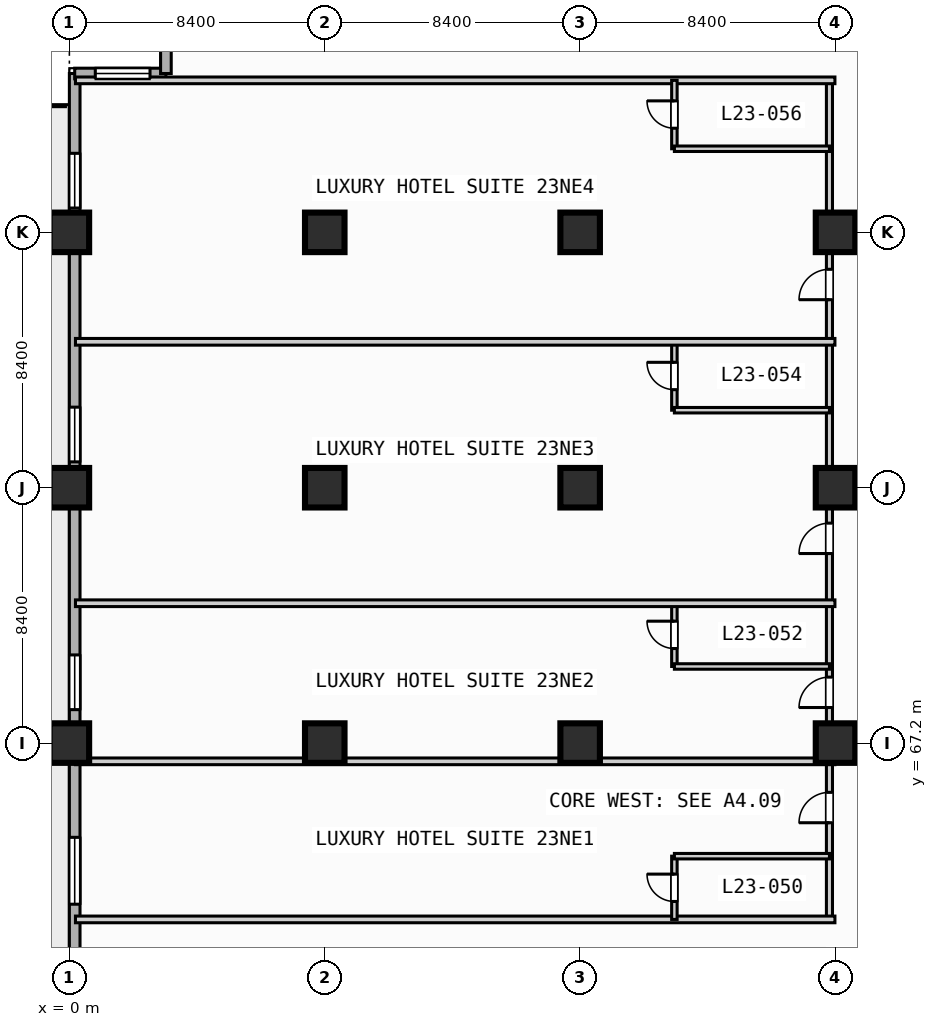
"""IFC4 building model, lengths in metres.
Left out: names, types, materials, properties, quantities, classifications, styles, units other than length and angle.
Written with IfcOpenShell. Run it as: python <this file> out.ifc"""

import sys

from ifc_helpers import new_model, si_unit, direction, frame, frame_2d, origin, origin_2d, place, context, subcontext, project, spatial, rectangle, extrude, element, fill, save


model = new_model("IFC4")
c1 = context("Model", 3, precision=1e-05, world=origin(), true_north=direction((0.0, 1.0)))
c2 = subcontext(c1, "Body", "Model", "MODEL_VIEW")
j1 = project(units=[si_unit("LENGTHUNIT", "METRE"), si_unit("PLANEANGLEUNIT", "RADIAN")], contexts=[c1])
p1 = place(None, origin())
s1 = spatial("IfcSite", under=j1, at=p1, CompositionType="ELEMENT")
p2 = place(p1, origin())
s2 = spatial("IfcBuilding", under=s1, at=p2, CompositionType="ELEMENT")
p3 = place(p2, frame((0.0, 0.0, 100.0)))
s3 = spatial("IfcBuildingStorey", under=s2, at=p3, CompositionType="ELEMENT", Elevation=100.0)
for number, where, z_axis, x_axis in (
    (1, (0.0, 67.2, 0.0), (0.0, 0.0, 1.0), (1.0, 0.0, 0.0)),
    (2, (0.0, 75.6, 0.0), (0.0, 0.0, 1.0), (1.0, 0.0, 0.0)),
    (3, (0.0, 84.0, 0.0), (0.0, 0.0, 1.0), (1.0, 0.0, 0.0)),
    (4, (8.4, 67.2, 0.0), (0.0, 0.0, 1.0), (1.0, 0.0, 0.0)),
    (5, (8.4, 75.6, 0.0), (0.0, 0.0, 1.0), (1.0, 0.0, 0.0)),
    (6, (8.4, 84.0, 0.0), (0.0, 0.0, 1.0), (1.0, 0.0, 0.0)),
    (7, (16.8, 67.2, 0.0), (0.0, 0.0, 1.0), (1.0, 0.0, 0.0)),
    (8, (16.8, 75.6, 0.0), (0.0, 0.0, 1.0), (1.0, 0.0, 0.0)),
    (9, (16.8, 84.0, 0.0), (0.0, 0.0, 1.0), (1.0, 0.0, 0.0)),
    (10, (25.2, 67.2, 0.0), (0.0, 0.0, 1.0), (1.0, 0.0, 0.0)),
    (11, (25.2, 75.6, 0.0), (0.0, 0.0, 1.0), (1.0, 0.0, 0.0)),
    (12, (25.2, 84.0, 0.0), (0.0, 0.0, 1.0), (1.0, 0.0, 0.0)),
):
    element("IfcColumn", number, at=place(p3, frame(where, z_axis=z_axis, x_axis=x_axis)), inside=s3, PredefinedType="COLUMN", context=c2, shape_type="SweptSolid", body=[
        extrude(rectangle(XDim=1.3, YDim=1.3, at=origin_2d()), origin(), (0.0, 0.0, 1.0), 3.8),
    ])
p4 = place(p3, frame((0.175, 3.175, 0.0), z_axis=(0.0, 0.0, 1.0), x_axis=(0.0, 1.0, 0.0)))
e13 = element("IfcWall", 13, at=p4, inside=s3, PredefinedType="STANDARD", context=c2, shape_type="SweptSolid", body=[
    extrude(rectangle(XDim=86.05, YDim=0.35, at=frame_2d((43.025, 0.0))), origin(), (0.0, 0.0, 1.0), 3.55),
])
p5 = place(p4, frame((42.325, 0.0, 0.0)))
e14 = element("IfcOpeningElement", 14, at=p5, cuts=e13, PredefinedType="OPENING", context=c2, shape_type="SweptSolid", body=[
    extrude(rectangle(XDim=1.4, YDim=2.2, at=frame_2d((0.7, 1.1))), frame((0.0, 0.185, 0.0), z_axis=(0.0, -1.0, 0.0), x_axis=(1.0, 0.0, 0.0)), (0.0, 0.0, 1.0), 0.37),
])
p6 = place(p4, frame((25.125, 0.0, 0.85)))
e15 = element("IfcOpeningElement", 15, at=p6, cuts=e13, PredefinedType="OPENING", context=c2, shape_type="SweptSolid", body=[
    extrude(rectangle(XDim=2.2, YDim=1.8, at=frame_2d((1.1, 0.9))), frame((0.0, 0.185, 0.0), z_axis=(0.0, -1.0, 0.0), x_axis=(1.0, 0.0, 0.0)), (0.0, 0.0, 1.0), 0.37),
])
p7 = place(p4, frame((33.525, 0.0, 0.85)))
e16 = element("IfcOpeningElement", 16, at=p7, cuts=e13, PredefinedType="OPENING", context=c2, shape_type="SweptSolid", body=[
    extrude(rectangle(XDim=2.2, YDim=1.8, at=frame_2d((1.1, 0.9))), frame((0.0, 0.185, 0.0), z_axis=(0.0, -1.0, 0.0), x_axis=(1.0, 0.0, 0.0)), (0.0, 0.0, 1.0), 0.37),
])
p8 = place(p4, frame((58.725, 0.0, 0.85)))
e17 = element("IfcOpeningElement", 17, at=p8, cuts=e13, PredefinedType="OPENING", context=c2, shape_type="SweptSolid", body=[
    extrude(rectangle(XDim=2.2, YDim=1.8, at=frame_2d((1.1, 0.9))), frame((0.0, 0.185, 0.0), z_axis=(0.0, -1.0, 0.0), x_axis=(1.0, 0.0, 0.0)), (0.0, 0.0, 1.0), 0.37),
])
p9 = place(p4, frame((65.125, 0.0, 0.85)))
e18 = element("IfcOpeningElement", 18, at=p9, cuts=e13, PredefinedType="OPENING", context=c2, shape_type="SweptSolid", body=[
    extrude(rectangle(XDim=1.8, YDim=1.8, at=frame_2d((0.9, 0.9))), frame((0.0, 0.185, 0.0), z_axis=(0.0, -1.0, 0.0), x_axis=(1.0, 0.0, 0.0)), (0.0, 0.0, 1.0), 0.37),
])
p10 = place(p4, frame((73.275, 0.0, 0.85)))
e19 = element("IfcOpeningElement", 19, at=p10, cuts=e13, PredefinedType="OPENING", context=c2, shape_type="SweptSolid", body=[
    extrude(rectangle(XDim=1.8, YDim=1.8, at=frame_2d((0.9, 0.9))), frame((0.0, 0.185, 0.0), z_axis=(0.0, -1.0, 0.0), x_axis=(1.0, 0.0, 0.0)), (0.0, 0.0, 1.0), 0.37),
])
p11 = place(p4, frame((81.625, 0.0, 0.85)))
e20 = element("IfcOpeningElement", 20, at=p11, cuts=e13, PredefinedType="OPENING", context=c2, shape_type="SweptSolid", body=[
    extrude(rectangle(XDim=1.8, YDim=1.8, at=frame_2d((0.9, 0.9))), frame((0.0, 0.185, 0.0), z_axis=(0.0, -1.0, 0.0), x_axis=(1.0, 0.0, 0.0)), (0.0, 0.0, 1.0), 0.37),
])
p12 = place(p3, frame((0.175, 89.225, 0.0), z_axis=(0.0, 0.0, 1.0), x_axis=(1.0, 0.0, 0.0)))
e21 = element("IfcWall", 21, at=p12, inside=s3, PredefinedType="STANDARD", context=c2, shape_type="SweptSolid", body=[
    extrude(rectangle(XDim=3.0, YDim=0.35, at=frame_2d((1.5, 0.0))), origin(), (0.0, 0.0, 1.0), 3.55),
])
p13 = place(p12, frame((0.677, 0.0, 0.85)))
e22 = element("IfcOpeningElement", 22, at=p13, cuts=e21, PredefinedType="OPENING", context=c2, shape_type="SweptSolid", body=[
    extrude(rectangle(XDim=1.8, YDim=1.8, at=frame_2d((0.9, 0.9))), frame((0.0, 0.185, 0.0), z_axis=(0.0, -1.0, 0.0), x_axis=(1.0, 0.0, 0.0)), (0.0, 0.0, 1.0), 0.37),
])
p14 = place(p3, frame((3.175, 89.225, 0.0), z_axis=(0.0, 0.0, 1.0), x_axis=(0.0, 1.0, 0.0)))
e23 = element("IfcWall", 23, at=p14, inside=s3, PredefinedType="STANDARD", context=c2, shape_type="SweptSolid", body=[
    extrude(rectangle(XDim=3.0, YDim=0.35, at=frame_2d((1.5, 0.0))), origin(), (0.0, 0.0, 1.0), 3.55),
])
p15 = place(p3, frame((25.0, 61.4, 0.0), z_axis=(0.0, 0.0, 1.0), x_axis=(0.0, 1.0, 0.0)))
e24 = element("IfcWall", 24, at=p15, inside=s3, PredefinedType="PARTITIONING", context=c2, shape_type="SweptSolid", body=[
    extrude(rectangle(XDim=27.6, YDim=0.2, at=frame_2d((13.8, 0.0))), origin(), (0.0, 0.0, 1.0), 2.8),
])
p16 = place(p15, frame((3.18, 0.0, 0.0)))
e25 = element("IfcOpeningElement", 25, at=p16, cuts=e24, PredefinedType="OPENING", context=c2, shape_type="SweptSolid", body=[
    extrude(rectangle(XDim=1.0, YDim=2.15, at=frame_2d((0.5, 1.075))), frame((0.0, 0.11, 0.0), z_axis=(0.0, -1.0, 0.0), x_axis=(1.0, 0.0, 0.0)), (0.0, 0.0, 1.0), 0.22),
])
p17 = place(p15, frame((6.97, 0.0, 0.0)))
e26 = element("IfcOpeningElement", 26, at=p17, cuts=e24, PredefinedType="OPENING", context=c2, shape_type="SweptSolid", body=[
    extrude(rectangle(XDim=1.0, YDim=2.15, at=frame_2d((0.5, 1.075))), frame((0.0, 0.11, 0.0), z_axis=(0.0, -1.0, 0.0), x_axis=(1.0, 0.0, 0.0)), (0.0, 0.0, 1.0), 0.22),
])
p18 = place(p15, frame((12.035, 0.0, 0.0)))
e27 = element("IfcOpeningElement", 27, at=p18, cuts=e24, PredefinedType="OPENING", context=c2, shape_type="SweptSolid", body=[
    extrude(rectangle(XDim=1.0, YDim=2.15, at=frame_2d((0.5, 1.075))), frame((0.0, 0.11, 0.0), z_axis=(0.0, -1.0, 0.0), x_axis=(1.0, 0.0, 0.0)), (0.0, 0.0, 1.0), 0.22),
])
p19 = place(p15, frame((20.385, 0.0, 0.0)))
e28 = element("IfcOpeningElement", 28, at=p19, cuts=e24, PredefinedType="OPENING", context=c2, shape_type="SweptSolid", body=[
    extrude(rectangle(XDim=1.0, YDim=2.15, at=frame_2d((0.5, 1.075))), frame((0.0, 0.11, 0.0), z_axis=(0.0, -1.0, 0.0), x_axis=(1.0, 0.0, 0.0)), (0.0, 0.0, 1.0), 0.22),
])
p20 = place(p3, frame((0.2, 61.4, 0.0), z_axis=(0.0, 0.0, 1.0), x_axis=(1.0, 0.0, 0.0)))
e29 = element("IfcWall", 29, at=p20, inside=s3, PredefinedType="PARTITIONING", context=c2, shape_type="SweptSolid", body=[
    extrude(rectangle(XDim=24.98, YDim=0.22, at=frame_2d((12.49, 0.0))), origin(), (0.0, 0.0, 1.0), 3.55),
])
p21 = place(p3, frame((19.9, 61.4, 0.0), z_axis=(0.0, 0.0, 1.0), x_axis=(0.0, 1.0, 0.0)))
e30 = element("IfcWall", 30, at=p21, inside=s3, PredefinedType="PLUMBINGWALL", context=c2, shape_type="SweptSolid", body=[
    extrude(rectangle(XDim=2.08, YDim=0.18, at=frame_2d((1.04, 0.0))), origin(), (0.0, 0.0, 1.0), 3.55),
])
p22 = place(p21, frame((0.59, 0.0, 0.0)))
e31 = element("IfcOpeningElement", 31, at=p22, cuts=e30, PredefinedType="OPENING", context=c2, shape_type="SweptSolid", body=[
    extrude(rectangle(XDim=0.9, YDim=2.1, at=frame_2d((0.45, 1.05))), frame((0.0, 0.1, 0.0), z_axis=(0.0, -1.0, 0.0), x_axis=(1.0, 0.0, 0.0)), (0.0, 0.0, 1.0), 0.2),
])
p23 = place(p3, frame((19.9, 63.48, 0.0), z_axis=(0.0, 0.0, 1.0), x_axis=(1.0, 0.0, 0.0)))
e32 = element("IfcWall", 32, at=p23, inside=s3, PredefinedType="PLUMBINGWALL", context=c2, shape_type="SweptSolid", body=[
    extrude(rectangle(XDim=5.1, YDim=0.18, at=frame_2d((2.55, 0.0))), origin(), (0.0, 0.0, 1.0), 3.55),
])
p24 = place(p3, frame((0.2, 66.6, 0.0), z_axis=(0.0, 0.0, 1.0), x_axis=(1.0, 0.0, 0.0)))
e33 = element("IfcWall", 33, at=p24, inside=s3, PredefinedType="PARTITIONING", context=c2, shape_type="SweptSolid", body=[
    extrude(rectangle(XDim=24.98, YDim=0.22, at=frame_2d((12.49, 0.0))), origin(), (0.0, 0.0, 1.0), 3.55),
])
p25 = place(p3, frame((19.9, 69.72, 0.0), z_axis=(0.0, 0.0, 1.0), x_axis=(0.0, 1.0, 0.0)))
e34 = element("IfcWall", 34, at=p25, inside=s3, PredefinedType="PLUMBINGWALL", context=c2, shape_type="SweptSolid", body=[
    extrude(rectangle(XDim=2.08, YDim=0.18, at=frame_2d((1.04, 0.0))), origin(), (0.0, 0.0, 1.0), 3.55),
])
p26 = place(p25, frame((0.59, 0.0, 0.0)))
e35 = element("IfcOpeningElement", 35, at=p26, cuts=e34, PredefinedType="OPENING", context=c2, shape_type="SweptSolid", body=[
    extrude(rectangle(XDim=0.9, YDim=2.1, at=frame_2d((0.45, 1.05))), frame((0.0, 0.1, 0.0), z_axis=(0.0, -1.0, 0.0), x_axis=(1.0, 0.0, 0.0)), (0.0, 0.0, 1.0), 0.2),
])
p27 = place(p3, frame((19.9, 69.72, 0.0), z_axis=(0.0, 0.0, 1.0), x_axis=(1.0, 0.0, 0.0)))
e36 = element("IfcWall", 36, at=p27, inside=s3, PredefinedType="PLUMBINGWALL", context=c2, shape_type="SweptSolid", body=[
    extrude(rectangle(XDim=5.1, YDim=0.18, at=frame_2d((2.55, 0.0))), origin(), (0.0, 0.0, 1.0), 3.55),
])
p28 = place(p3, frame((0.2, 71.8, 0.0), z_axis=(0.0, 0.0, 1.0), x_axis=(1.0, 0.0, 0.0)))
e37 = element("IfcWall", 37, at=p28, inside=s3, PredefinedType="PARTITIONING", context=c2, shape_type="SweptSolid", body=[
    extrude(rectangle(XDim=24.98, YDim=0.22, at=frame_2d((12.49, 0.0))), origin(), (0.0, 0.0, 1.0), 3.55),
])
p29 = place(p3, frame((19.9, 78.15, 0.0), z_axis=(0.0, 0.0, 1.0), x_axis=(0.0, 1.0, 0.0)))
e38 = element("IfcWall", 38, at=p29, inside=s3, PredefinedType="PLUMBINGWALL", context=c2, shape_type="SweptSolid", body=[
    extrude(rectangle(XDim=2.25, YDim=0.18, at=frame_2d((1.125, 0.0))), origin(), (0.0, 0.0, 1.0), 3.55),
])
p30 = place(p29, frame((0.675, 0.0, 0.0)))
e39 = element("IfcOpeningElement", 39, at=p30, cuts=e38, PredefinedType="OPENING", context=c2, shape_type="SweptSolid", body=[
    extrude(rectangle(XDim=0.9, YDim=2.1, at=frame_2d((0.45, 1.05))), frame((0.0, 0.1, 0.0), z_axis=(0.0, -1.0, 0.0), x_axis=(1.0, 0.0, 0.0)), (0.0, 0.0, 1.0), 0.2),
])
p31 = place(p3, frame((19.9, 78.15, 0.0), z_axis=(0.0, 0.0, 1.0), x_axis=(1.0, 0.0, 0.0)))
e40 = element("IfcWall", 40, at=p31, inside=s3, PredefinedType="PLUMBINGWALL", context=c2, shape_type="SweptSolid", body=[
    extrude(rectangle(XDim=5.1, YDim=0.18, at=frame_2d((2.55, 0.0))), origin(), (0.0, 0.0, 1.0), 3.55),
])
for number, where, z_axis, x_axis in (
    (41, (0.2, 80.4, 0.0), (0.0, 0.0, 1.0), (1.0, 0.0, 0.0)),
    (42, (0.2, 89.0, 0.0), (0.0, 0.0, 1.0), (1.0, 0.0, 0.0)),
):
    element("IfcWall", number, at=place(p3, frame(where, z_axis=z_axis, x_axis=x_axis)), inside=s3, PredefinedType="PARTITIONING", context=c2, shape_type="SweptSolid", body=[
        extrude(rectangle(XDim=24.98, YDim=0.22, at=frame_2d((12.49, 0.0))), origin(), (0.0, 0.0, 1.0), 3.55),
    ])
p32 = place(p3, frame((19.9, 86.75, 0.0), z_axis=(0.0, 0.0, 1.0), x_axis=(0.0, 1.0, 0.0)))
e43 = element("IfcWall", 43, at=p32, inside=s3, PredefinedType="PLUMBINGWALL", context=c2, shape_type="SweptSolid", body=[
    extrude(rectangle(XDim=2.25, YDim=0.18, at=frame_2d((1.125, 0.0))), origin(), (0.0, 0.0, 1.0), 3.55),
])
p33 = place(p32, frame((0.675, 0.0, 0.0)))
e44 = element("IfcOpeningElement", 44, at=p33, cuts=e43, PredefinedType="OPENING", context=c2, shape_type="SweptSolid", body=[
    extrude(rectangle(XDim=0.9, YDim=2.1, at=frame_2d((0.45, 1.05))), frame((0.0, 0.1, 0.0), z_axis=(0.0, -1.0, 0.0), x_axis=(1.0, 0.0, 0.0)), (0.0, 0.0, 1.0), 0.2),
])
p34 = place(p3, frame((19.9, 86.75, 0.0), z_axis=(0.0, 0.0, 1.0), x_axis=(1.0, 0.0, 0.0)))
e45 = element("IfcWall", 45, at=p34, inside=s3, PredefinedType="PLUMBINGWALL", context=c2, shape_type="SweptSolid", body=[
    extrude(rectangle(XDim=5.1, YDim=0.18, at=frame_2d((2.55, 0.0))), origin(), (0.0, 0.0, 1.0), 3.55),
])
p35 = place(p8, origin())
e46 = element("IfcWindow", 46, at=p35, inside=s3, PartitioningType="SINGLE_PANEL", PredefinedType="WINDOW", context=c2, shape_type="SweptSolid", body=[
    extrude(rectangle(XDim=2.2, YDim=1.8, at=frame_2d((1.1, 0.9))), frame((0.0, 0.03, 0.0), z_axis=(0.0, -1.0, 0.0), x_axis=(1.0, 0.0, 0.0)), (0.0, 0.0, 1.0), 0.06),
])
fill(e17, e46)
p36 = place(p9, origin())
e47 = element("IfcWindow", 47, at=p36, inside=s3, PartitioningType="SINGLE_PANEL", PredefinedType="WINDOW", context=c2, shape_type="SweptSolid", body=[
    extrude(rectangle(XDim=1.8, YDim=1.8, at=frame_2d((0.9, 0.9))), frame((0.0, 0.03, 0.0), z_axis=(0.0, -1.0, 0.0), x_axis=(1.0, 0.0, 0.0)), (0.0, 0.0, 1.0), 0.06),
])
fill(e18, e47)
p37 = place(p10, origin())
e48 = element("IfcWindow", 48, at=p37, inside=s3, PartitioningType="SINGLE_PANEL", PredefinedType="WINDOW", context=c2, shape_type="SweptSolid", body=[
    extrude(rectangle(XDim=1.8, YDim=1.8, at=frame_2d((0.9, 0.9))), frame((0.0, 0.03, 0.0), z_axis=(0.0, -1.0, 0.0), x_axis=(1.0, 0.0, 0.0)), (0.0, 0.0, 1.0), 0.06),
])
fill(e19, e48)
p38 = place(p11, origin())
e49 = element("IfcWindow", 49, at=p38, inside=s3, PartitioningType="SINGLE_PANEL", PredefinedType="WINDOW", context=c2, shape_type="SweptSolid", body=[
    extrude(rectangle(XDim=1.8, YDim=1.8, at=frame_2d((0.9, 0.9))), frame((0.0, 0.03, 0.0), z_axis=(0.0, -1.0, 0.0), x_axis=(1.0, 0.0, 0.0)), (0.0, 0.0, 1.0), 0.06),
])
fill(e20, e49)
p39 = place(p13, origin())
e50 = element("IfcWindow", 50, at=p39, inside=s3, PartitioningType="SINGLE_PANEL", PredefinedType="WINDOW", context=c2, shape_type="SweptSolid", body=[
    extrude(rectangle(XDim=1.8, YDim=1.8, at=frame_2d((0.9, 0.9))), frame((0.0, 0.03, 0.0), z_axis=(0.0, -1.0, 0.0), x_axis=(1.0, 0.0, 0.0)), (0.0, 0.0, 1.0), 0.06),
])
fill(e22, e50)
p40 = place(p16, origin())
e51 = element("IfcDoor", 51, at=p40, inside=s3, OperationType="SINGLE_SWING_LEFT", PredefinedType="DOOR", context=c2, shape_type="SweptSolid", body=[
    extrude(rectangle(XDim=1.0, YDim=2.15, at=frame_2d((0.5, 1.075))), frame((0.0, 0.025, 0.0), z_axis=(0.0, -1.0, 0.0), x_axis=(1.0, 0.0, 0.0)), (0.0, 0.0, 1.0), 0.05),
])
fill(e25, e51)
p41 = place(p17, origin())
e52 = element("IfcDoor", 52, at=p41, inside=s3, OperationType="SINGLE_SWING_LEFT", PredefinedType="DOOR", context=c2, shape_type="SweptSolid", body=[
    extrude(rectangle(XDim=1.0, YDim=2.15, at=frame_2d((0.5, 1.075))), frame((0.0, 0.025, 0.0), z_axis=(0.0, -1.0, 0.0), x_axis=(1.0, 0.0, 0.0)), (0.0, 0.0, 1.0), 0.05),
])
fill(e26, e52)
p42 = place(p18, origin())
e53 = element("IfcDoor", 53, at=p42, inside=s3, OperationType="SINGLE_SWING_LEFT", PredefinedType="DOOR", context=c2, shape_type="SweptSolid", body=[
    extrude(rectangle(XDim=1.0, YDim=2.15, at=frame_2d((0.5, 1.075))), frame((0.0, 0.025, 0.0), z_axis=(0.0, -1.0, 0.0), x_axis=(1.0, 0.0, 0.0)), (0.0, 0.0, 1.0), 0.05),
])
fill(e27, e53)
p43 = place(p19, origin())
e54 = element("IfcDoor", 54, at=p43, inside=s3, OperationType="SINGLE_SWING_LEFT", PredefinedType="DOOR", context=c2, shape_type="SweptSolid", body=[
    extrude(rectangle(XDim=1.0, YDim=2.15, at=frame_2d((0.5, 1.075))), frame((0.0, 0.025, 0.0), z_axis=(0.0, -1.0, 0.0), x_axis=(1.0, 0.0, 0.0)), (0.0, 0.0, 1.0), 0.05),
])
fill(e28, e54)
p44 = place(p22, origin())
e55 = element("IfcDoor", 55, at=p44, inside=s3, OperationType="SINGLE_SWING_RIGHT", PredefinedType="DOOR", context=c2, shape_type="SweptSolid", body=[
    extrude(rectangle(XDim=0.9, YDim=2.1, at=frame_2d((0.45, 1.05))), frame((0.0, 0.025, 0.0), z_axis=(0.0, -1.0, 0.0), x_axis=(1.0, 0.0, 0.0)), (0.0, 0.0, 1.0), 0.05),
])
fill(e31, e55)
p45 = place(p26, origin())
e56 = element("IfcDoor", 56, at=p45, inside=s3, OperationType="SINGLE_SWING_RIGHT", PredefinedType="DOOR", context=c2, shape_type="SweptSolid", body=[
    extrude(rectangle(XDim=0.9, YDim=2.1, at=frame_2d((0.45, 1.05))), frame((0.0, 0.025, 0.0), z_axis=(0.0, -1.0, 0.0), x_axis=(1.0, 0.0, 0.0)), (0.0, 0.0, 1.0), 0.05),
])
fill(e35, e56)
p46 = place(p30, origin())
e57 = element("IfcDoor", 57, at=p46, inside=s3, OperationType="SINGLE_SWING_RIGHT", PredefinedType="DOOR", context=c2, shape_type="SweptSolid", body=[
    extrude(rectangle(XDim=0.9, YDim=2.1, at=frame_2d((0.45, 1.05))), frame((0.0, 0.025, 0.0), z_axis=(0.0, -1.0, 0.0), x_axis=(1.0, 0.0, 0.0)), (0.0, 0.0, 1.0), 0.05),
])
fill(e39, e57)
p47 = place(p33, origin())
e58 = element("IfcDoor", 58, at=p47, inside=s3, OperationType="SINGLE_SWING_RIGHT", PredefinedType="DOOR", context=c2, shape_type="SweptSolid", body=[
    extrude(rectangle(XDim=0.9, YDim=2.1, at=frame_2d((0.45, 1.05))), frame((0.0, 0.025, 0.0), z_axis=(0.0, -1.0, 0.0), x_axis=(1.0, 0.0, 0.0)), (0.0, 0.0, 1.0), 0.05),
])
fill(e44, e58)
save(model, sys.argv[1])
